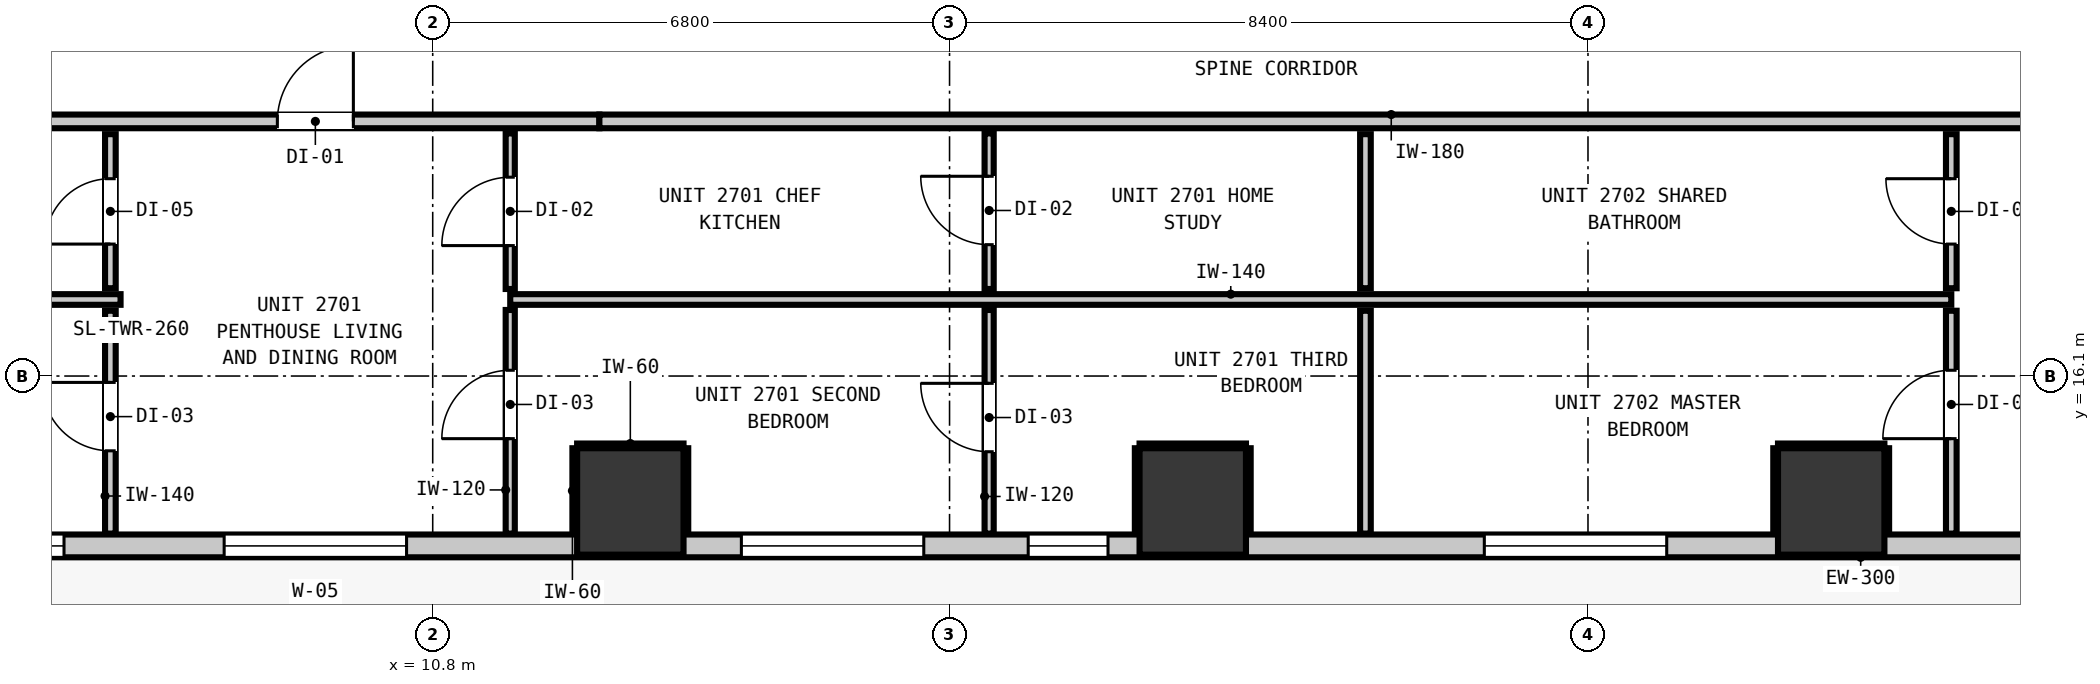
"""IFC4 building model, lengths in metres.
Left out: names, types, materials, properties, quantities, classifications, styles, units other than length and angle.
Written with IfcOpenShell. Run it as: python <this file> out.ifc"""

import sys

from ifc_helpers import new_model, si_unit, direction, frame, frame_2d, origin, origin_2d, place, context, subcontext, project, spatial, rectangle, extrude, element, fill, save


model = new_model("IFC4")
c1 = context("Model", 3, precision=1e-05, world=origin(), true_north=direction((0.0, 1.0)))
c2 = subcontext(c1, "Body", "Model", "MODEL_VIEW")
j1 = project(units=[si_unit("LENGTHUNIT", "METRE"), si_unit("PLANEANGLEUNIT", "RADIAN")], contexts=[c1])
p1 = place(None, origin())
s1 = spatial("IfcSite", under=j1, at=p1, CompositionType="ELEMENT")
p2 = place(p1, origin())
s2 = spatial("IfcBuilding", under=s1, at=p2, CompositionType="ELEMENT")
p3 = place(p2, frame((0.0, 0.0, 96.12)))
s3 = spatial("IfcBuildingStorey", under=s2, at=p3, CompositionType="ELEMENT", Elevation=96.12)
for number, where, z_axis, x_axis in (
    (1, (13.4, 14.45, 0.0), (0.0, 0.0, 1.0), (1.0, 0.0, 0.0)),
    (2, (20.8, 14.45, 0.0), (0.0, 0.0, 1.0), (1.0, 0.0, 0.0)),
    (3, (29.2, 14.45, 0.0), (0.0, 0.0, 1.0), (1.0, 0.0, 0.0)),
):
    element("IfcColumn", number, at=place(p3, frame(where, z_axis=z_axis, x_axis=x_axis)), inside=s3, PredefinedType="COLUMN", context=c2, shape_type="SweptSolid", body=[
        extrude(rectangle(XDim=1.4, YDim=1.4, at=origin_2d()), origin(), (0.0, 0.0, 1.0), 3.32),
    ])
p4 = place(p3, frame((41.635, 13.865, 0.0), z_axis=(0.0, 0.0, 1.0), x_axis=(-1.0, 0.0, 0.0)))
e4 = element("IfcWall", 4, at=p4, inside=s3, PredefinedType="STANDARD", context=c2, shape_type="SweptSolid", body=[
    extrude(rectangle(XDim=37.47, YDim=0.3, at=frame_2d((18.735, 0.0))), origin(), (0.0, 0.0, 1.0), 3.06),
])
p5 = place(p4, frame((0.901, 0.0, 0.0)))
e5 = element("IfcOpeningElement", 5, at=p5, cuts=e4, PredefinedType="OPENING", context=c2, shape_type="SweptSolid", body=[
    extrude(rectangle(XDim=1.0, YDim=2.15, at=frame_2d((0.5, 1.075))), frame((0.0, 0.16, 0.0), z_axis=(0.0, -1.0, 0.0), x_axis=(1.0, 0.0, 0.0)), (0.0, 0.0, 1.0), 0.32),
])
p6 = place(p4, frame((31.179, 0.0, 0.85)))
e6 = element("IfcOpeningElement", 6, at=p6, cuts=e4, PredefinedType="OPENING", context=c2, shape_type="SweptSolid", body=[
    extrude(rectangle(XDim=2.4, YDim=1.95, at=frame_2d((1.2, 0.975))), frame((0.0, 0.16, 0.0), z_axis=(0.0, -1.0, 0.0), x_axis=(1.0, 0.0, 0.0)), (0.0, 0.0, 1.0), 0.32),
])
p7 = place(p4, frame((35.686, 0.0, 0.85)))
e7 = element("IfcOpeningElement", 7, at=p7, cuts=e4, PredefinedType="OPENING", context=c2, shape_type="SweptSolid", body=[
    extrude(rectangle(XDim=1.05, YDim=1.65, at=frame_2d((0.525, 0.825))), frame((0.0, 0.16, 0.0), z_axis=(0.0, -1.0, 0.0), x_axis=(1.0, 0.0, 0.0)), (0.0, 0.0, 1.0), 0.32),
])
p8 = place(p4, frame((24.374, 0.0, 0.85)))
e8 = element("IfcOpeningElement", 8, at=p8, cuts=e4, PredefinedType="OPENING", context=c2, shape_type="SweptSolid", body=[
    extrude(rectangle(XDim=2.4, YDim=1.95, at=frame_2d((1.2, 0.975))), frame((0.0, 0.16, 0.0), z_axis=(0.0, -1.0, 0.0), x_axis=(1.0, 0.0, 0.0)), (0.0, 0.0, 1.0), 0.32),
])
p9 = place(p4, frame((21.95, 0.0, 0.85)))
e9 = element("IfcOpeningElement", 9, at=p9, cuts=e4, PredefinedType="OPENING", context=c2, shape_type="SweptSolid", body=[
    extrude(rectangle(XDim=1.05, YDim=1.65, at=frame_2d((0.525, 0.825))), frame((0.0, 0.16, 0.0), z_axis=(0.0, -1.0, 0.0), x_axis=(1.0, 0.0, 0.0)), (0.0, 0.0, 1.0), 0.32),
])
p10 = place(p4, frame((7.095, 0.0, 0.85)))
e10 = element("IfcOpeningElement", 10, at=p10, cuts=e4, PredefinedType="OPENING", context=c2, shape_type="SweptSolid", body=[
    extrude(rectangle(XDim=2.4, YDim=1.95, at=frame_2d((1.2, 0.975))), frame((0.0, 0.16, 0.0), z_axis=(0.0, -1.0, 0.0), x_axis=(1.0, 0.0, 0.0)), (0.0, 0.0, 1.0), 0.32),
])
p11 = place(p4, frame((14.599, 0.0, 0.85)))
e11 = element("IfcOpeningElement", 11, at=p11, cuts=e4, PredefinedType="OPENING", context=c2, shape_type="SweptSolid", body=[
    extrude(rectangle(XDim=2.4, YDim=1.95, at=frame_2d((1.2, 0.975))), frame((0.0, 0.16, 0.0), z_axis=(0.0, -1.0, 0.0), x_axis=(1.0, 0.0, 0.0)), (0.0, 0.0, 1.0), 0.32),
])
p12 = place(p4, frame((2.328, 0.0, 0.85)))
e12 = element("IfcOpeningElement", 12, at=p12, cuts=e4, PredefinedType="OPENING", context=c2, shape_type="SweptSolid", body=[
    extrude(rectangle(XDim=0.9, YDim=1.5, at=frame_2d((0.45, 0.75))), frame((0.0, 0.16, 0.0), z_axis=(0.0, -1.0, 0.0), x_axis=(1.0, 0.0, 0.0)), (0.0, 0.0, 1.0), 0.32),
])
p13 = place(p3, frame((2.657, 19.45, 0.0), z_axis=(0.0, 0.0, 1.0), x_axis=(1.0, 0.0, 0.0)))
e13 = element("IfcWall", 13, at=p13, inside=s3, PredefinedType="PARTITIONING", context=c2, shape_type="SweptSolid", body=[
    extrude(rectangle(XDim=10.336, YDim=0.18, at=frame_2d((5.168, 0.0))), origin(), (0.0, 0.0, 1.0), 2.445),
])
p14 = place(p13, frame((6.099, 0.0, 0.0)))
e14 = element("IfcOpeningElement", 14, at=p14, cuts=e13, PredefinedType="OPENING", context=c2, shape_type="SweptSolid", body=[
    extrude(rectangle(XDim=1.0, YDim=2.15, at=frame_2d((0.5, 1.075))), frame((0.0, 0.1, 0.0), z_axis=(0.0, -1.0, 0.0), x_axis=(1.0, 0.0, 0.0)), (0.0, 0.0, 1.0), 0.2),
])
p15 = place(p3, frame((12.993, 19.45, 0.0), z_axis=(0.0, 0.0, 1.0), x_axis=(1.0, 0.0, 0.0)))
e15 = element("IfcWall", 15, at=p15, inside=s3, PredefinedType="PARTITIONING", context=c2, shape_type="SweptSolid", body=[
    extrude(rectangle(XDim=30.98, YDim=0.18, at=frame_2d((15.49, 0.0))), origin(), (0.0, 0.0, 1.0), 3.06),
])
p16 = place(p15, frame((20.937, 0.0, 0.0)))
e16 = element("IfcOpeningElement", 16, at=p16, cuts=e15, PredefinedType="OPENING", context=c2, shape_type="SweptSolid", body=[
    extrude(rectangle(XDim=1.0, YDim=2.15, at=frame_2d((0.5, 1.075))), frame((0.0, 0.1, 0.0), z_axis=(0.0, -1.0, 0.0), x_axis=(1.0, 0.0, 0.0)), (0.0, 0.0, 1.0), 0.2),
])
p17 = place(p3, frame((1.827, 17.107, 0.0), z_axis=(0.0, 0.0, 1.0), x_axis=(1.0, 0.0, 0.0)))
e17 = element("IfcWall", 17, at=p17, inside=s3, PredefinedType="PARTITIONING", context=c2, shape_type="SweptSolid", body=[
    extrude(rectangle(XDim=4.866, YDim=0.14, at=frame_2d((2.433, 0.0))), origin(), (0.0, 0.0, 1.0), 3.06),
])
p18 = place(p3, frame((11.82, 17.107, 0.0), z_axis=(0.0, 0.0, 1.0), x_axis=(1.0, 0.0, 0.0)))
e18 = element("IfcWall", 18, at=p18, inside=s3, PredefinedType="PARTITIONING", context=c2, shape_type="SweptSolid", body=[
    extrude(rectangle(XDim=18.96, YDim=0.14, at=frame_2d((9.48, 0.0))), origin(), (0.0, 0.0, 1.0), 3.06),
])
p19 = place(p3, frame((6.559, 14.027, 0.0), z_axis=(0.0, 0.0, 1.0), x_axis=(0.0, 1.0, 0.0)))
e19 = element("IfcWall", 19, at=p19, inside=s3, PredefinedType="PARTITIONING", context=c2, shape_type="SweptSolid", body=[
    extrude(rectangle(XDim=2.932, YDim=0.14, at=frame_2d((1.466, 0.0))), origin(), (0.0, 0.0, 1.0), 3.06),
])
p20 = place(p19, frame((1.089, 0.0, 0.0)))
e20 = element("IfcOpeningElement", 20, at=p20, cuts=e19, PredefinedType="OPENING", context=c2, shape_type="SweptSolid", body=[
    extrude(rectangle(XDim=0.9, YDim=2.1, at=frame_2d((0.45, 1.05))), frame((0.0, 0.08, 0.0), z_axis=(0.0, -1.0, 0.0), x_axis=(1.0, 0.0, 0.0)), (0.0, 0.0, 1.0), 0.16),
])
p21 = place(p3, frame((6.559, 17.255, 0.0), z_axis=(0.0, 0.0, 1.0), x_axis=(0.0, 1.0, 0.0)))
e21 = element("IfcWall", 21, at=p21, inside=s3, PredefinedType="PARTITIONING", context=c2, shape_type="SweptSolid", body=[
    extrude(rectangle(XDim=2.027, YDim=0.14, at=frame_2d((1.014, 0.0))), origin(), (0.0, 0.0, 1.0), 3.06),
])
p22 = place(p21, frame((0.581, 0.0, 0.0)))
e22 = element("IfcOpeningElement", 22, at=p22, cuts=e21, PredefinedType="OPENING", context=c2, shape_type="SweptSolid", body=[
    extrude(rectangle(XDim=0.86, YDim=2.02, at=frame_2d((0.43, 1.01))), frame((0.0, 0.08, 0.0), z_axis=(0.0, -1.0, 0.0), x_axis=(1.0, 0.0, 0.0)), (0.0, 0.0, 1.0), 0.16),
])
p23 = place(p3, frame((23.072, 14.027, 0.0), z_axis=(0.0, 0.0, 1.0), x_axis=(0.0, 1.0, 0.0)))
e23 = element("IfcWall", 23, at=p23, inside=s3, PredefinedType="PARTITIONING", context=c2, shape_type="SweptSolid", body=[
    extrude(rectangle(XDim=2.932, YDim=0.14, at=frame_2d((1.466, 0.0))), origin(), (0.0, 0.0, 1.0), 3.06),
])
p24 = place(p3, frame((23.072, 17.255, 0.0), z_axis=(0.0, 0.0, 1.0), x_axis=(0.0, 1.0, 0.0)))
e24 = element("IfcWall", 24, at=p24, inside=s3, PredefinedType="PARTITIONING", context=c2, shape_type="SweptSolid", body=[
    extrude(rectangle(XDim=2.027, YDim=0.14, at=frame_2d((1.014, 0.0))), origin(), (0.0, 0.0, 1.0), 3.06),
])
p25 = place(p3, frame((30.78, 14.027, 0.0), z_axis=(0.0, 0.0, 1.0), x_axis=(0.0, 1.0, 0.0)))
e25 = element("IfcWall", 25, at=p25, inside=s3, PredefinedType="PARTITIONING", context=c2, shape_type="SweptSolid", body=[
    extrude(rectangle(XDim=2.932, YDim=0.14, at=frame_2d((1.466, 0.0))), origin(), (0.0, 0.0, 1.0), 3.06),
])
p26 = place(p25, frame((1.249, 0.0, 0.0)))
e26 = element("IfcOpeningElement", 26, at=p26, cuts=e25, PredefinedType="OPENING", context=c2, shape_type="SweptSolid", body=[
    extrude(rectangle(XDim=0.9, YDim=2.1, at=frame_2d((0.45, 1.05))), frame((0.0, 0.08, 0.0), z_axis=(0.0, -1.0, 0.0), x_axis=(1.0, 0.0, 0.0)), (0.0, 0.0, 1.0), 0.16),
])
p27 = place(p3, frame((30.78, 17.255, 0.0), z_axis=(0.0, 0.0, 1.0), x_axis=(0.0, 1.0, 0.0)))
e27 = element("IfcWall", 27, at=p27, inside=s3, PredefinedType="PARTITIONING", context=c2, shape_type="SweptSolid", body=[
    extrude(rectangle(XDim=2.027, YDim=0.14, at=frame_2d((1.014, 0.0))), origin(), (0.0, 0.0, 1.0), 3.06),
])
p28 = place(p27, frame((0.581, 0.0, 0.0)))
e28 = element("IfcOpeningElement", 28, at=p28, cuts=e27, PredefinedType="OPENING", context=c2, shape_type="SweptSolid", body=[
    extrude(rectangle(XDim=0.86, YDim=2.02, at=frame_2d((0.43, 1.01))), frame((0.0, 0.08, 0.0), z_axis=(0.0, -1.0, 0.0), x_axis=(1.0, 0.0, 0.0)), (0.0, 0.0, 1.0), 0.16),
])
p29 = place(p3, frame((11.82, 14.027, 0.0), z_axis=(0.0, 0.0, 1.0), x_axis=(0.0, 1.0, 0.0)))
e29 = element("IfcWall", 29, at=p29, inside=s3, PredefinedType="PARTITIONING", context=c2, shape_type="SweptSolid", body=[
    extrude(rectangle(XDim=2.942, YDim=0.12, at=frame_2d((1.471, 0.0))), origin(), (0.0, 0.0, 1.0), 3.06),
])
p30 = place(p29, frame((1.249, 0.0, 0.0)))
e30 = element("IfcOpeningElement", 30, at=p30, cuts=e29, PredefinedType="OPENING", context=c2, shape_type="SweptSolid", body=[
    extrude(rectangle(XDim=0.9, YDim=2.1, at=frame_2d((0.45, 1.05))), frame((0.0, 0.07, 0.0), z_axis=(0.0, -1.0, 0.0), x_axis=(1.0, 0.0, 0.0)), (0.0, 0.0, 1.0), 0.14),
])
p31 = place(p3, frame((11.82, 17.245, 0.0), z_axis=(0.0, 0.0, 1.0), x_axis=(0.0, 1.0, 0.0)))
e31 = element("IfcWall", 31, at=p31, inside=s3, PredefinedType="PARTITIONING", context=c2, shape_type="SweptSolid", body=[
    extrude(rectangle(XDim=2.047, YDim=0.12, at=frame_2d((1.023, 0.0))), origin(), (0.0, 0.0, 1.0), 3.06),
])
p32 = place(p31, frame((0.571, 0.0, 0.0)))
e32 = element("IfcOpeningElement", 32, at=p32, cuts=e31, PredefinedType="OPENING", context=c2, shape_type="SweptSolid", body=[
    extrude(rectangle(XDim=0.9, YDim=2.1, at=frame_2d((0.45, 1.05))), frame((0.0, 0.07, 0.0), z_axis=(0.0, -1.0, 0.0), x_axis=(1.0, 0.0, 0.0)), (0.0, 0.0, 1.0), 0.14),
])
p33 = place(p3, frame((18.121, 14.027, 0.0), z_axis=(0.0, 0.0, 1.0), x_axis=(0.0, 1.0, 0.0)))
e33 = element("IfcWall", 33, at=p33, inside=s3, PredefinedType="PARTITIONING", context=c2, shape_type="SweptSolid", body=[
    extrude(rectangle(XDim=2.942, YDim=0.12, at=frame_2d((1.471, 0.0))), origin(), (0.0, 0.0, 1.0), 3.06),
])
p34 = place(p33, frame((1.077, 0.0, 0.0)))
e34 = element("IfcOpeningElement", 34, at=p34, cuts=e33, PredefinedType="OPENING", context=c2, shape_type="SweptSolid", body=[
    extrude(rectangle(XDim=0.9, YDim=2.1, at=frame_2d((0.45, 1.05))), frame((0.0, 0.07, 0.0), z_axis=(0.0, -1.0, 0.0), x_axis=(1.0, 0.0, 0.0)), (0.0, 0.0, 1.0), 0.14),
])
p35 = place(p3, frame((18.121, 17.245, 0.0), z_axis=(0.0, 0.0, 1.0), x_axis=(0.0, 1.0, 0.0)))
e35 = element("IfcWall", 35, at=p35, inside=s3, PredefinedType="PARTITIONING", context=c2, shape_type="SweptSolid", body=[
    extrude(rectangle(XDim=2.047, YDim=0.12, at=frame_2d((1.023, 0.0))), origin(), (0.0, 0.0, 1.0), 3.06),
])
p36 = place(p35, frame((0.583, 0.0, 0.0)))
e36 = element("IfcOpeningElement", 36, at=p36, cuts=e35, PredefinedType="OPENING", context=c2, shape_type="SweptSolid", body=[
    extrude(rectangle(XDim=0.9, YDim=2.1, at=frame_2d((0.45, 1.05))), frame((0.0, 0.07, 0.0), z_axis=(0.0, -1.0, 0.0), x_axis=(1.0, 0.0, 0.0)), (0.0, 0.0, 1.0), 0.14),
])
p37 = place(p3, frame((12.7, 15.182, 0.0), z_axis=(0.0, 0.0, 1.0), x_axis=(1.0, 0.0, 0.0)))
e37 = element("IfcWall", 37, at=p37, inside=s3, PredefinedType="PARTITIONING", context=c2, shape_type="SweptSolid", body=[
    extrude(rectangle(XDim=1.4, YDim=0.06, at=frame_2d((0.7, 0.0))), origin(), (0.0, 0.0, 1.0), 1.45),
])
for number, where, z_axis, x_axis in (
    (38, (12.668, 14.03, 0.0), (0.0, 0.0, 1.0), (0.0, 1.0, 0.0)),
    (39, (14.132, 14.03, 0.0), (0.0, 0.0, 1.0), (0.0, 1.0, 0.0)),
):
    element("IfcWall", number, at=place(p3, frame(where, z_axis=z_axis, x_axis=x_axis)), inside=s3, PredefinedType="PARTITIONING", context=c2, shape_type="SweptSolid", body=[
        extrude(rectangle(XDim=1.12, YDim=0.06, at=frame_2d((0.56, 0.0))), origin(), (0.0, 0.0, 1.0), 1.45),
    ])
p38 = place(p3, frame((20.1, 15.182, 0.0), z_axis=(0.0, 0.0, 1.0), x_axis=(1.0, 0.0, 0.0)))
e40 = element("IfcWall", 40, at=p38, inside=s3, PredefinedType="PARTITIONING", context=c2, shape_type="SweptSolid", body=[
    extrude(rectangle(XDim=1.4, YDim=0.06, at=frame_2d((0.7, 0.0))), origin(), (0.0, 0.0, 1.0), 1.45),
])
for number, where, z_axis, x_axis in (
    (41, (20.068, 14.03, 0.0), (0.0, 0.0, 1.0), (0.0, 1.0, 0.0)),
    (42, (21.532, 14.03, 0.0), (0.0, 0.0, 1.0), (0.0, 1.0, 0.0)),
):
    element("IfcWall", number, at=place(p3, frame(where, z_axis=z_axis, x_axis=x_axis)), inside=s3, PredefinedType="PARTITIONING", context=c2, shape_type="SweptSolid", body=[
        extrude(rectangle(XDim=1.12, YDim=0.06, at=frame_2d((0.56, 0.0))), origin(), (0.0, 0.0, 1.0), 1.45),
    ])
p39 = place(p3, frame((28.5, 15.182, 0.0), z_axis=(0.0, 0.0, 1.0), x_axis=(1.0, 0.0, 0.0)))
e43 = element("IfcWall", 43, at=p39, inside=s3, PredefinedType="PARTITIONING", context=c2, shape_type="SweptSolid", body=[
    extrude(rectangle(XDim=1.4, YDim=0.06, at=frame_2d((0.7, 0.0))), origin(), (0.0, 0.0, 1.0), 1.45),
])
for number, where, z_axis, x_axis in (
    (44, (28.468, 14.03, 0.0), (0.0, 0.0, 1.0), (0.0, 1.0, 0.0)),
    (45, (29.932, 14.03, 0.0), (0.0, 0.0, 1.0), (0.0, 1.0, 0.0)),
):
    element("IfcWall", number, at=place(p3, frame(where, z_axis=z_axis, x_axis=x_axis)), inside=s3, PredefinedType="PARTITIONING", context=c2, shape_type="SweptSolid", body=[
        extrude(rectangle(XDim=1.12, YDim=0.06, at=frame_2d((0.56, 0.0))), origin(), (0.0, 0.0, 1.0), 1.45),
    ])
p40 = place(p6, origin())
e46 = element("IfcWindow", 46, at=p40, inside=s3, PartitioningType="SINGLE_PANEL", PredefinedType="WINDOW", context=c2, shape_type="SweptSolid", body=[
    extrude(rectangle(XDim=2.4, YDim=1.95, at=frame_2d((1.2, 0.975))), frame((0.0, 0.03, 0.0), z_axis=(0.0, -1.0, 0.0), x_axis=(1.0, 0.0, 0.0)), (0.0, 0.0, 1.0), 0.06),
])
fill(e6, e46)
p41 = place(p7, origin())
e47 = element("IfcWindow", 47, at=p41, inside=s3, PartitioningType="SINGLE_PANEL", PredefinedType="WINDOW", context=c2, shape_type="SweptSolid", body=[
    extrude(rectangle(XDim=1.05, YDim=1.65, at=frame_2d((0.525, 0.825))), frame((0.0, 0.03, 0.0), z_axis=(0.0, -1.0, 0.0), x_axis=(1.0, 0.0, 0.0)), (0.0, 0.0, 1.0), 0.06),
])
fill(e7, e47)
p42 = place(p8, origin())
e48 = element("IfcWindow", 48, at=p42, inside=s3, PartitioningType="SINGLE_PANEL", PredefinedType="WINDOW", context=c2, shape_type="SweptSolid", body=[
    extrude(rectangle(XDim=2.4, YDim=1.95, at=frame_2d((1.2, 0.975))), frame((0.0, 0.03, 0.0), z_axis=(0.0, -1.0, 0.0), x_axis=(1.0, 0.0, 0.0)), (0.0, 0.0, 1.0), 0.06),
])
fill(e8, e48)
p43 = place(p9, origin())
e49 = element("IfcWindow", 49, at=p43, inside=s3, PartitioningType="SINGLE_PANEL", PredefinedType="WINDOW", context=c2, shape_type="SweptSolid", body=[
    extrude(rectangle(XDim=1.05, YDim=1.65, at=frame_2d((0.525, 0.825))), frame((0.0, 0.03, 0.0), z_axis=(0.0, -1.0, 0.0), x_axis=(1.0, 0.0, 0.0)), (0.0, 0.0, 1.0), 0.06),
])
fill(e9, e49)
p44 = place(p11, origin())
e50 = element("IfcWindow", 50, at=p44, inside=s3, PartitioningType="SINGLE_PANEL", PredefinedType="WINDOW", context=c2, shape_type="SweptSolid", body=[
    extrude(rectangle(XDim=2.4, YDim=1.95, at=frame_2d((1.2, 0.975))), frame((0.0, 0.03, 0.0), z_axis=(0.0, -1.0, 0.0), x_axis=(1.0, 0.0, 0.0)), (0.0, 0.0, 1.0), 0.06),
])
fill(e11, e50)
p45 = place(p14, origin())
e51 = element("IfcDoor", 51, at=p45, inside=s3, OperationType="SINGLE_SWING_RIGHT", PredefinedType="DOOR", context=c2, shape_type="SweptSolid", body=[
    extrude(rectangle(XDim=1.0, YDim=2.15, at=frame_2d((0.5, 1.075))), frame((0.0, 0.025, 0.0), z_axis=(0.0, -1.0, 0.0), x_axis=(1.0, 0.0, 0.0)), (0.0, 0.0, 1.0), 0.05),
])
fill(e14, e51)
p46 = place(p22, origin())
e52 = element("IfcDoor", 52, at=p46, inside=s3, OperationType="SINGLE_SWING_LEFT", PredefinedType="DOOR", context=c2, shape_type="SweptSolid", body=[
    extrude(rectangle(XDim=0.86, YDim=2.02, at=frame_2d((0.43, 1.01))), frame((0.0, 0.025, 0.0), z_axis=(0.0, -1.0, 0.0), x_axis=(1.0, 0.0, 0.0)), (0.0, 0.0, 1.0), 0.05),
])
fill(e22, e52)
p47 = place(p20, origin())
e53 = element("IfcDoor", 53, at=p47, inside=s3, OperationType="SINGLE_SWING_RIGHT", PredefinedType="DOOR", context=c2, shape_type="SweptSolid", body=[
    extrude(rectangle(XDim=0.9, YDim=2.1, at=frame_2d((0.45, 1.05))), frame((0.0, 0.025, 0.0), z_axis=(0.0, -1.0, 0.0), x_axis=(1.0, 0.0, 0.0)), (0.0, 0.0, 1.0), 0.05),
])
fill(e20, e53)
p48 = place(p32, origin())
e54 = element("IfcDoor", 54, at=p48, inside=s3, OperationType="SINGLE_SWING_LEFT", PredefinedType="DOOR", context=c2, shape_type="SweptSolid", body=[
    extrude(rectangle(XDim=0.9, YDim=2.1, at=frame_2d((0.45, 1.05))), frame((0.0, 0.025, 0.0), z_axis=(0.0, -1.0, 0.0), x_axis=(1.0, 0.0, 0.0)), (0.0, 0.0, 1.0), 0.05),
])
fill(e32, e54)
p49 = place(p36, origin())
e55 = element("IfcDoor", 55, at=p49, inside=s3, OperationType="SINGLE_SWING_RIGHT", PredefinedType="DOOR", context=c2, shape_type="SweptSolid", body=[
    extrude(rectangle(XDim=0.9, YDim=2.1, at=frame_2d((0.45, 1.05))), frame((0.0, 0.025, 0.0), z_axis=(0.0, -1.0, 0.0), x_axis=(1.0, 0.0, 0.0)), (0.0, 0.0, 1.0), 0.05),
])
fill(e36, e55)
p50 = place(p30, origin())
e56 = element("IfcDoor", 56, at=p50, inside=s3, OperationType="SINGLE_SWING_LEFT", PredefinedType="DOOR", context=c2, shape_type="SweptSolid", body=[
    extrude(rectangle(XDim=0.9, YDim=2.1, at=frame_2d((0.45, 1.05))), frame((0.0, 0.025, 0.0), z_axis=(0.0, -1.0, 0.0), x_axis=(1.0, 0.0, 0.0)), (0.0, 0.0, 1.0), 0.05),
])
fill(e30, e56)
p51 = place(p34, origin())
e57 = element("IfcDoor", 57, at=p51, inside=s3, OperationType="SINGLE_SWING_RIGHT", PredefinedType="DOOR", context=c2, shape_type="SweptSolid", body=[
    extrude(rectangle(XDim=0.9, YDim=2.1, at=frame_2d((0.45, 1.05))), frame((0.0, 0.025, 0.0), z_axis=(0.0, -1.0, 0.0), x_axis=(1.0, 0.0, 0.0)), (0.0, 0.0, 1.0), 0.05),
])
fill(e34, e57)
p52 = place(p28, origin())
e58 = element("IfcDoor", 58, at=p52, inside=s3, OperationType="SINGLE_SWING_RIGHT", PredefinedType="DOOR", context=c2, shape_type="SweptSolid", body=[
    extrude(rectangle(XDim=0.86, YDim=2.02, at=frame_2d((0.43, 1.01))), frame((0.0, 0.025, 0.0), z_axis=(0.0, -1.0, 0.0), x_axis=(1.0, 0.0, 0.0)), (0.0, 0.0, 1.0), 0.05),
])
fill(e28, e58)
p53 = place(p26, origin())
e59 = element("IfcDoor", 59, at=p53, inside=s3, OperationType="SINGLE_SWING_LEFT", PredefinedType="DOOR", context=c2, shape_type="SweptSolid", body=[
    extrude(rectangle(XDim=0.9, YDim=2.1, at=frame_2d((0.45, 1.05))), frame((0.0, 0.025, 0.0), z_axis=(0.0, -1.0, 0.0), x_axis=(1.0, 0.0, 0.0)), (0.0, 0.0, 1.0), 0.05),
])
fill(e26, e59)
save(model, sys.argv[1])
